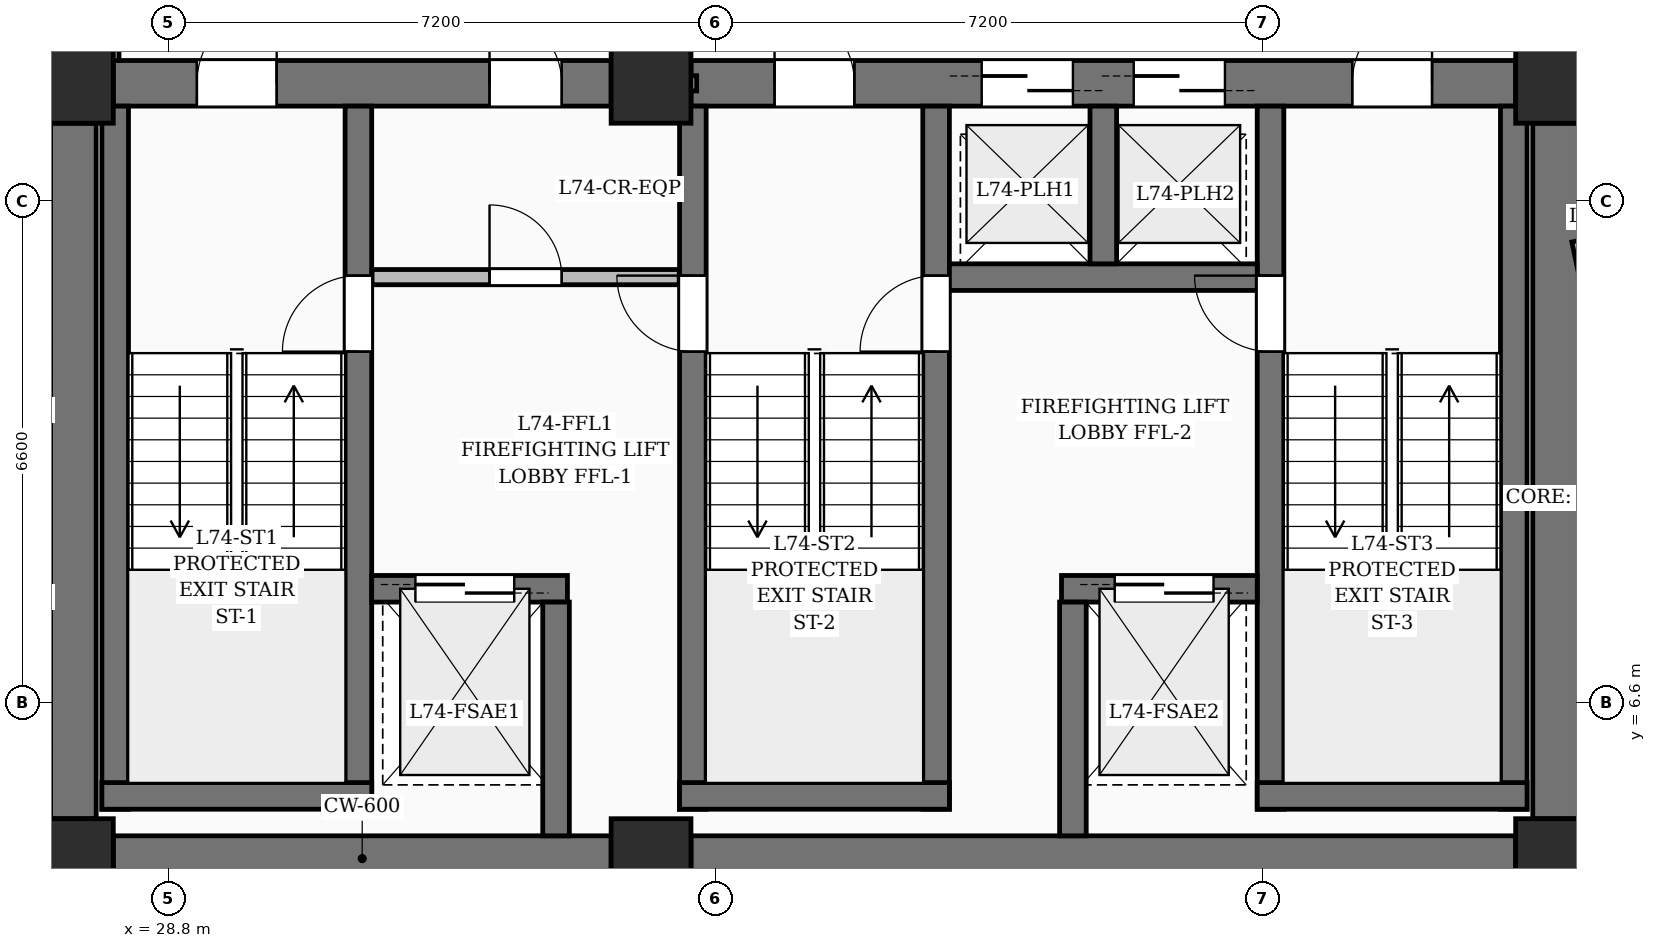
"""IFC4 building model, lengths in metres.
Left out: names, types, materials, properties, quantities, classifications, styles, units other than length and angle.
Written with IfcOpenShell. Run it as: python <this file> out.ifc"""

import sys

from ifc_helpers import new_model, si_unit, direction, frame, frame_2d, origin, origin_2d, place, context, subcontext, project, spatial, rectangle, extrude, element, fill, save


model = new_model("IFC4")
c1 = context("Model", 3, precision=1e-05, world=origin(), true_north=direction((0.0, 1.0)))
c2 = subcontext(c1, "Body", "Model", "MODEL_VIEW")
j1 = project(units=[si_unit("LENGTHUNIT", "METRE"), si_unit("PLANEANGLEUNIT", "RADIAN")], contexts=[c1])
p1 = place(None, origin())
s1 = spatial("IfcSite", under=j1, at=p1, CompositionType="ELEMENT")
p2 = place(p1, origin())
s2 = spatial("IfcBuilding", under=s1, at=p2, CompositionType="ELEMENT")
p3 = place(p2, frame((0.0, 0.0, 285.75)))
s3 = spatial("IfcBuildingStorey", under=s2, at=p3, CompositionType="ELEMENT", Elevation=285.75)
for number, where, z_axis, x_axis in (
    (1, (27.55, 4.55, 0.0), (0.0, 0.0, 1.0), (1.0, 0.0, 0.0)),
    (2, (35.15, 4.55, 0.0), (0.0, 0.0, 1.0), (1.0, 0.0, 0.0)),
    (3, (47.05, 4.55, 0.0), (0.0, 0.0, 1.0), (1.0, 0.0, 0.0)),
    (4, (27.55, 14.75, 0.0), (0.0, 0.0, 1.0), (1.0, 0.0, 0.0)),
    (5, (35.15, 14.75, 0.0), (0.0, 0.0, 1.0), (1.0, 0.0, 0.0)),
    (6, (47.05, 14.75, 0.0), (0.0, 0.0, 1.0), (1.0, 0.0, 0.0)),
):
    element("IfcColumn", number, at=place(p3, frame(where, z_axis=z_axis, x_axis=x_axis)), inside=s3, PredefinedType="COLUMN", context=c2, shape_type="SweptSolid", body=[
        extrude(rectangle(XDim=1.05, YDim=1.05, at=origin_2d()), origin(), (0.0, 0.0, 1.0), 3.75),
    ])
p4 = place(p3, frame((28.075, 4.55, 0.0), z_axis=(0.0, 0.0, 1.0), x_axis=(1.0, 0.0, 0.0)))
e7 = element("IfcWall", 7, at=p4, inside=s3, PredefinedType="SHEAR", context=c2, shape_type="SweptSolid", body=[
    extrude(rectangle(XDim=6.55, YDim=0.6, at=frame_2d((3.275, 0.0))), origin(), (0.0, 0.0, 1.0), 3.75),
])
p5 = place(p3, frame((35.675, 4.55, 0.0), z_axis=(0.0, 0.0, 1.0), x_axis=(1.0, 0.0, 0.0)))
e8 = element("IfcWall", 8, at=p5, inside=s3, PredefinedType="SHEAR", context=c2, shape_type="SweptSolid", body=[
    extrude(rectangle(XDim=10.85, YDim=0.6, at=frame_2d((5.425, 0.0))), origin(), (0.0, 0.0, 1.0), 3.75),
])
p6 = place(p3, frame((28.075, 14.75, 0.0), z_axis=(0.0, 0.0, 1.0), x_axis=(1.0, 0.0, 0.0)))
e9 = element("IfcWall", 9, at=p6, inside=s3, PredefinedType="SHEAR", context=c2, shape_type="SweptSolid", body=[
    extrude(rectangle(XDim=6.55, YDim=0.6, at=frame_2d((3.275, 0.0))), origin(), (0.0, 0.0, 1.0), 3.75),
])
p7 = place(p6, frame((1.1, 0.0, 0.0)))
e10 = element("IfcOpeningElement", 10, at=p7, cuts=e9, PredefinedType="OPENING", context=c2, shape_type="SweptSolid", body=[
    extrude(rectangle(XDim=1.05, YDim=2.15, at=frame_2d((0.525, 1.075))), frame((0.0, 0.31, 0.0), z_axis=(0.0, -1.0, 0.0), x_axis=(1.0, 0.0, 0.0)), (0.0, 0.0, 1.0), 0.62),
])
p8 = place(p6, frame((4.95, 0.0, 0.0)))
e11 = element("IfcOpeningElement", 11, at=p8, cuts=e9, PredefinedType="OPENING", context=c2, shape_type="SweptSolid", body=[
    extrude(rectangle(XDim=0.95, YDim=2.15, at=frame_2d((0.475, 1.075))), frame((0.0, 0.31, 0.0), z_axis=(0.0, -1.0, 0.0), x_axis=(1.0, 0.0, 0.0)), (0.0, 0.0, 1.0), 0.62),
])
p9 = place(p3, frame((35.675, 14.75, 0.0), z_axis=(0.0, 0.0, 1.0), x_axis=(1.0, 0.0, 0.0)))
e12 = element("IfcWall", 12, at=p9, inside=s3, PredefinedType="SHEAR", context=c2, shape_type="SweptSolid", body=[
    extrude(rectangle(XDim=10.85, YDim=0.6, at=frame_2d((5.425, 0.0))), origin(), (0.0, 0.0, 1.0), 3.75),
])
p10 = place(p9, frame((1.1, 0.0, 0.0)))
e13 = element("IfcOpeningElement", 13, at=p10, cuts=e12, PredefinedType="OPENING", context=c2, shape_type="SweptSolid", body=[
    extrude(rectangle(XDim=1.05, YDim=2.15, at=frame_2d((0.525, 1.075))), frame((0.0, 0.31, 0.0), z_axis=(0.0, -1.0, 0.0), x_axis=(1.0, 0.0, 0.0)), (0.0, 0.0, 1.0), 0.62),
])
p11 = place(p9, frame((8.7, 0.0, 0.0)))
e14 = element("IfcOpeningElement", 14, at=p11, cuts=e12, PredefinedType="OPENING", context=c2, shape_type="SweptSolid", body=[
    extrude(rectangle(XDim=1.05, YDim=2.15, at=frame_2d((0.525, 1.075))), frame((0.0, 0.31, 0.0), z_axis=(0.0, -1.0, 0.0), x_axis=(1.0, 0.0, 0.0)), (0.0, 0.0, 1.0), 0.62),
])
p12 = place(p9, frame((3.825, 0.0, 0.0)))
e15 = element("IfcOpeningElement", 15, at=p12, cuts=e12, PredefinedType="OPENING", context=c2, shape_type="SweptSolid", body=[
    extrude(rectangle(XDim=1.2, YDim=2.2, at=frame_2d((0.6, 1.1))), frame((0.0, 0.31, 0.0), z_axis=(0.0, -1.0, 0.0), x_axis=(1.0, 0.0, 0.0)), (0.0, 0.0, 1.0), 0.62),
])
p13 = place(p9, frame((5.825, 0.0, 0.0)))
e16 = element("IfcOpeningElement", 16, at=p13, cuts=e12, PredefinedType="OPENING", context=c2, shape_type="SweptSolid", body=[
    extrude(rectangle(XDim=1.2, YDim=2.2, at=frame_2d((0.6, 1.1))), frame((0.0, 0.31, 0.0), z_axis=(0.0, -1.0, 0.0), x_axis=(1.0, 0.0, 0.0)), (0.0, 0.0, 1.0), 0.62),
])
for number, where, z_axis, x_axis in (
    (17, (27.55, 5.075, 0.0), (0.0, 0.0, 1.0), (0.0, 1.0, 0.0)),
    (18, (47.05, 5.075, 0.0), (0.0, 0.0, 1.0), (0.0, 1.0, 0.0)),
):
    element("IfcWall", number, at=place(p3, frame(where, z_axis=z_axis, x_axis=x_axis)), inside=s3, PredefinedType="SHEAR", context=c2, shape_type="SweptSolid", body=[
        extrude(rectangle(XDim=9.15, YDim=0.6, at=frame_2d((4.575, 0.0))), origin(), (0.0, 0.0, 1.0), 3.75),
    ])
p14 = place(p3, frame((28.1, 5.2, 0.0), z_axis=(0.0, 0.0, 1.0), x_axis=(0.0, 1.0, 0.0)))
e19 = element("IfcWall", 19, at=p14, inside=s3, PredefinedType="SOLIDWALL", context=c2, shape_type="SweptSolid", body=[
    extrude(rectangle(XDim=9.25, YDim=0.35, at=frame_2d((4.625, 0.0))), origin(), (0.0, 0.0, 1.0), 3.75),
])
p15 = place(p3, frame((31.3, 5.2, 0.0), z_axis=(0.0, 0.0, 1.0), x_axis=(0.0, 1.0, 0.0)))
e20 = element("IfcWall", 20, at=p15, inside=s3, PredefinedType="SOLIDWALL", context=c2, shape_type="SweptSolid", body=[
    extrude(rectangle(XDim=9.25, YDim=0.35, at=frame_2d((4.625, 0.0))), origin(), (0.0, 0.0, 1.0), 3.75),
])
p16 = place(p15, frame((6.02, 0.0, 0.0)))
e21 = element("IfcOpeningElement", 21, at=p16, cuts=e20, PredefinedType="OPENING", context=c2, shape_type="SweptSolid", body=[
    extrude(rectangle(XDim=1.0, YDim=2.15, at=frame_2d((0.5, 1.075))), frame((0.0, 0.185, 0.0), z_axis=(0.0, -1.0, 0.0), x_axis=(1.0, 0.0, 0.0)), (0.0, 0.0, 1.0), 0.37),
])
p17 = place(p3, frame((27.925, 5.375, 0.0), z_axis=(0.0, 0.0, 1.0), x_axis=(1.0, 0.0, 0.0)))
e22 = element("IfcWall", 22, at=p17, inside=s3, PredefinedType="SOLIDWALL", context=c2, shape_type="SweptSolid", body=[
    extrude(rectangle(XDim=3.55, YDim=0.35, at=frame_2d((1.775, 0.0))), origin(), (0.0, 0.0, 1.0), 3.75),
])
p18 = place(p3, frame((35.7, 5.2, 0.0), z_axis=(0.0, 0.0, 1.0), x_axis=(0.0, 1.0, 0.0)))
e23 = element("IfcWall", 23, at=p18, inside=s3, PredefinedType="SOLIDWALL", context=c2, shape_type="SweptSolid", body=[
    extrude(rectangle(XDim=9.25, YDim=0.35, at=frame_2d((4.625, 0.0))), origin(), (0.0, 0.0, 1.0), 3.75),
])
p19 = place(p18, frame((6.02, 0.0, 0.0)))
e24 = element("IfcOpeningElement", 24, at=p19, cuts=e23, PredefinedType="OPENING", context=c2, shape_type="SweptSolid", body=[
    extrude(rectangle(XDim=1.0, YDim=2.15, at=frame_2d((0.5, 1.075))), frame((0.0, 0.185, 0.0), z_axis=(0.0, -1.0, 0.0), x_axis=(1.0, 0.0, 0.0)), (0.0, 0.0, 1.0), 0.37),
])
p20 = place(p3, frame((38.9, 5.2, 0.0), z_axis=(0.0, 0.0, 1.0), x_axis=(0.0, 1.0, 0.0)))
e25 = element("IfcWall", 25, at=p20, inside=s3, PredefinedType="SOLIDWALL", context=c2, shape_type="SweptSolid", body=[
    extrude(rectangle(XDim=9.25, YDim=0.35, at=frame_2d((4.625, 0.0))), origin(), (0.0, 0.0, 1.0), 3.75),
])
p21 = place(p20, frame((6.02, 0.0, 0.0)))
e26 = element("IfcOpeningElement", 26, at=p21, cuts=e25, PredefinedType="OPENING", context=c2, shape_type="SweptSolid", body=[
    extrude(rectangle(XDim=1.0, YDim=2.15, at=frame_2d((0.5, 1.075))), frame((0.0, 0.185, 0.0), z_axis=(0.0, -1.0, 0.0), x_axis=(1.0, 0.0, 0.0)), (0.0, 0.0, 1.0), 0.37),
])
p22 = place(p3, frame((35.525, 5.375, 0.0), z_axis=(0.0, 0.0, 1.0), x_axis=(1.0, 0.0, 0.0)))
e27 = element("IfcWall", 27, at=p22, inside=s3, PredefinedType="SOLIDWALL", context=c2, shape_type="SweptSolid", body=[
    extrude(rectangle(XDim=3.55, YDim=0.35, at=frame_2d((1.775, 0.0))), origin(), (0.0, 0.0, 1.0), 3.75),
])
p23 = place(p3, frame((43.3, 5.2, 0.0), z_axis=(0.0, 0.0, 1.0), x_axis=(0.0, 1.0, 0.0)))
e28 = element("IfcWall", 28, at=p23, inside=s3, PredefinedType="SOLIDWALL", context=c2, shape_type="SweptSolid", body=[
    extrude(rectangle(XDim=9.25, YDim=0.35, at=frame_2d((4.625, 0.0))), origin(), (0.0, 0.0, 1.0), 3.75),
])
p24 = place(p23, frame((6.02, 0.0, 0.0)))
e29 = element("IfcOpeningElement", 29, at=p24, cuts=e28, PredefinedType="OPENING", context=c2, shape_type="SweptSolid", body=[
    extrude(rectangle(XDim=1.0, YDim=2.15, at=frame_2d((0.5, 1.075))), frame((0.0, 0.185, 0.0), z_axis=(0.0, -1.0, 0.0), x_axis=(1.0, 0.0, 0.0)), (0.0, 0.0, 1.0), 0.37),
])
p25 = place(p3, frame((46.5, 5.2, 0.0), z_axis=(0.0, 0.0, 1.0), x_axis=(0.0, 1.0, 0.0)))
e30 = element("IfcWall", 30, at=p25, inside=s3, PredefinedType="SOLIDWALL", context=c2, shape_type="SweptSolid", body=[
    extrude(rectangle(XDim=9.25, YDim=0.35, at=frame_2d((4.625, 0.0))), origin(), (0.0, 0.0, 1.0), 3.75),
])
p26 = place(p3, frame((43.125, 5.375, 0.0), z_axis=(0.0, 0.0, 1.0), x_axis=(1.0, 0.0, 0.0)))
e31 = element("IfcWall", 31, at=p26, inside=s3, PredefinedType="SOLIDWALL", context=c2, shape_type="SweptSolid", body=[
    extrude(rectangle(XDim=3.55, YDim=0.35, at=frame_2d((1.775, 0.0))), origin(), (0.0, 0.0, 1.0), 3.75),
])
p27 = place(p3, frame((31.475, 8.1, 0.0), z_axis=(0.0, 0.0, 1.0), x_axis=(1.0, 0.0, 0.0)))
e32 = element("IfcWall", 32, at=p27, inside=s3, PredefinedType="SOLIDWALL", context=c2, shape_type="SweptSolid", body=[
    extrude(rectangle(XDim=2.575, YDim=0.35, at=frame_2d((1.288, 0.0))), origin(), (0.0, 0.0, 1.0), 3.75),
])
p28 = place(p27, frame((0.575, 0.0, 0.0)))
e33 = element("IfcOpeningElement", 33, at=p28, cuts=e32, PredefinedType="OPENING", context=c2, shape_type="SweptSolid", body=[
    extrude(rectangle(XDim=1.3, YDim=2.25, at=frame_2d((0.65, 1.125))), frame((0.0, 0.185, 0.0), z_axis=(0.0, -1.0, 0.0), x_axis=(1.0, 0.0, 0.0)), (0.0, 0.0, 1.0), 0.37),
])
p29 = place(p3, frame((40.55, 8.1, 0.0), z_axis=(0.0, 0.0, 1.0), x_axis=(1.0, 0.0, 0.0)))
e34 = element("IfcWall", 34, at=p29, inside=s3, PredefinedType="SOLIDWALL", context=c2, shape_type="SweptSolid", body=[
    extrude(rectangle(XDim=2.575, YDim=0.35, at=frame_2d((1.288, 0.0))), origin(), (0.0, 0.0, 1.0), 3.75),
])
p30 = place(p29, frame((0.7, 0.0, 0.0)))
e35 = element("IfcOpeningElement", 35, at=p30, cuts=e34, PredefinedType="OPENING", context=c2, shape_type="SweptSolid", body=[
    extrude(rectangle(XDim=1.3, YDim=2.25, at=frame_2d((0.65, 1.125))), frame((0.0, 0.185, 0.0), z_axis=(0.0, -1.0, 0.0), x_axis=(1.0, 0.0, 0.0)), (0.0, 0.0, 1.0), 0.37),
])
for number, where, z_axis, x_axis in (
    (36, (33.9, 4.85, 0.0), (0.0, 0.0, 1.0), (0.0, 1.0, 0.0)),
    (37, (40.7, 4.85, 0.0), (0.0, 0.0, 1.0), (0.0, 1.0, 0.0)),
):
    element("IfcWall", number, at=place(p3, frame(where, z_axis=z_axis, x_axis=x_axis)), inside=s3, PredefinedType="SOLIDWALL", context=c2, shape_type="SweptSolid", body=[
        extrude(rectangle(XDim=3.075, YDim=0.35, at=frame_2d((1.538, 0.0))), origin(), (0.0, 0.0, 1.0), 3.75),
    ])
p31 = place(p3, frame((39.075, 12.2, 0.0), z_axis=(0.0, 0.0, 1.0), x_axis=(1.0, 0.0, 0.0)))
e38 = element("IfcWall", 38, at=p31, inside=s3, PredefinedType="SOLIDWALL", context=c2, shape_type="SweptSolid", body=[
    extrude(rectangle(XDim=4.05, YDim=0.35, at=frame_2d((2.025, 0.0))), origin(), (0.0, 0.0, 1.0), 3.75),
])
p32 = place(p3, frame((41.1, 12.375, 0.0), z_axis=(0.0, 0.0, 1.0), x_axis=(0.0, 1.0, 0.0)))
e39 = element("IfcWall", 39, at=p32, inside=s3, PredefinedType="SOLIDWALL", context=c2, shape_type="SweptSolid", body=[
    extrude(rectangle(XDim=2.075, YDim=0.35, at=frame_2d((1.038, 0.0))), origin(), (0.0, 0.0, 1.0), 3.75),
])
p33 = place(p3, frame((34.72, 14.75, 0.0), z_axis=(0.0, 0.0, 1.0), x_axis=(1.0, 0.0, 0.0)))
e40 = element("IfcWall", 40, at=p33, inside=s3, PredefinedType="PARTITIONING", context=c2, shape_type="SweptSolid", body=[
    extrude(rectangle(XDim=1.03, YDim=0.2, at=frame_2d((0.515, 0.0))), origin(), (0.0, 0.0, 1.0), 2.635),
])
p34 = place(p3, frame((31.48, 12.2, 0.0), z_axis=(0.0, 0.0, 1.0), x_axis=(1.0, 0.0, 0.0)))
e41 = element("IfcWall", 41, at=p34, inside=s3, PredefinedType="PARTITIONING", context=c2, shape_type="SweptSolid", body=[
    extrude(rectangle(XDim=4.04, YDim=0.2, at=frame_2d((2.02, 0.0))), origin(), (0.0, 0.0, 1.0), 3.45),
])
p35 = place(p34, frame((1.545, 0.0, 0.0)))
e42 = element("IfcOpeningElement", 42, at=p35, cuts=e41, PredefinedType="OPENING", context=c2, shape_type="SweptSolid", body=[
    extrude(rectangle(XDim=0.95, YDim=2.15, at=frame_2d((0.475, 1.075))), frame((0.0, 0.11, 0.0), z_axis=(0.0, -1.0, 0.0), x_axis=(1.0, 0.0, 0.0)), (0.0, 0.0, 1.0), 0.22),
])
p36 = place(p3, frame((46.8, 15.05, 0.0), z_axis=(0.0, 0.0, 1.0), x_axis=(0.0, 1.0, 0.0)))
e43 = element("IfcWall", 43, at=p36, inside=s3, PredefinedType="PARTITIONING", context=c2, shape_type="SweptSolid", body=[
    extrude(rectangle(XDim=2.3, YDim=0.2, at=frame_2d((1.15, 0.0))), origin(), (0.0, 0.0, 1.0), 2.635),
])
p37 = place(p3, frame((49.642, 1.897, 0.0), z_axis=(0.0, 0.0, 1.0), x_axis=(-0.207911994687, 0.978147536144, 0.0)))
e44 = element("IfcWall", 44, at=p37, inside=s3, PredefinedType="PARTITIONING", context=c2, shape_type="SweptSolid", body=[
    extrude(rectangle(XDim=11.024, YDim=0.175, at=frame_2d((5.512, 0.0))), origin(), (0.0, 0.0, 1.0), 2.635),
])
p38 = place(p37, frame((4.928, 0.0, 0.0)))
e45 = element("IfcOpeningElement", 45, at=p38, cuts=e44, PredefinedType="OPENING", context=c2, shape_type="SweptSolid", body=[
    extrude(rectangle(XDim=0.95, YDim=2.2, at=frame_2d((0.475, 1.1))), frame((0.0, 0.097, 0.0), z_axis=(0.0, -1.0, 0.0), x_axis=(1.0, 0.0, 0.0)), (0.0, 0.0, 1.0), 0.195),
])
p39 = place(p3, frame((28.05, 17.265, 0.0), z_axis=(0.0, 0.0, 1.0), x_axis=(0.0, -1.0, 0.0)))
e46 = element("IfcWall", 46, at=p39, inside=s3, PredefinedType="PARTITIONING", context=c2, shape_type="SweptSolid", body=[
    extrude(rectangle(XDim=2.215, YDim=0.2, at=frame_2d((1.107, 0.0))), origin(), (0.0, 0.0, 1.0), 3.45),
])
p40 = place(p7, origin())
e47 = element("IfcDoor", 47, at=p40, inside=s3, OperationType="SINGLE_SWING_RIGHT", PredefinedType="DOOR", context=c2, shape_type="SweptSolid", body=[
    extrude(rectangle(XDim=1.05, YDim=2.15, at=frame_2d((0.525, 1.075))), frame((0.0, 0.025, 0.0), z_axis=(0.0, -1.0, 0.0), x_axis=(1.0, 0.0, 0.0)), (0.0, 0.0, 1.0), 0.05),
])
fill(e10, e47)
p41 = place(p10, origin())
e48 = element("IfcDoor", 48, at=p41, inside=s3, OperationType="SINGLE_SWING_LEFT", PredefinedType="DOOR", context=c2, shape_type="SweptSolid", body=[
    extrude(rectangle(XDim=1.05, YDim=2.15, at=frame_2d((0.525, 1.075))), frame((0.0, 0.025, 0.0), z_axis=(0.0, -1.0, 0.0), x_axis=(1.0, 0.0, 0.0)), (0.0, 0.0, 1.0), 0.05),
])
fill(e13, e48)
p42 = place(p11, origin())
e49 = element("IfcDoor", 49, at=p42, inside=s3, OperationType="SINGLE_SWING_RIGHT", PredefinedType="DOOR", context=c2, shape_type="SweptSolid", body=[
    extrude(rectangle(XDim=1.05, YDim=2.15, at=frame_2d((0.525, 1.075))), frame((0.0, 0.025, 0.0), z_axis=(0.0, -1.0, 0.0), x_axis=(1.0, 0.0, 0.0)), (0.0, 0.0, 1.0), 0.05),
])
fill(e14, e49)
p43 = place(p16, origin())
e50 = element("IfcDoor", 50, at=p43, inside=s3, OperationType="SINGLE_SWING_LEFT", PredefinedType="DOOR", context=c2, shape_type="SweptSolid", body=[
    extrude(rectangle(XDim=1.0, YDim=2.15, at=frame_2d((0.5, 1.075))), frame((0.0, 0.025, 0.0), z_axis=(0.0, -1.0, 0.0), x_axis=(1.0, 0.0, 0.0)), (0.0, 0.0, 1.0), 0.05),
])
fill(e21, e50)
p44 = place(p19, origin())
e51 = element("IfcDoor", 51, at=p44, inside=s3, OperationType="SINGLE_SWING_RIGHT", PredefinedType="DOOR", context=c2, shape_type="SweptSolid", body=[
    extrude(rectangle(XDim=1.0, YDim=2.15, at=frame_2d((0.5, 1.075))), frame((0.0, 0.025, 0.0), z_axis=(0.0, -1.0, 0.0), x_axis=(1.0, 0.0, 0.0)), (0.0, 0.0, 1.0), 0.05),
])
fill(e24, e51)
p45 = place(p21, origin())
e52 = element("IfcDoor", 52, at=p45, inside=s3, OperationType="SINGLE_SWING_LEFT", PredefinedType="DOOR", context=c2, shape_type="SweptSolid", body=[
    extrude(rectangle(XDim=1.0, YDim=2.15, at=frame_2d((0.5, 1.075))), frame((0.0, 0.025, 0.0), z_axis=(0.0, -1.0, 0.0), x_axis=(1.0, 0.0, 0.0)), (0.0, 0.0, 1.0), 0.05),
])
fill(e26, e52)
p46 = place(p24, origin())
e53 = element("IfcDoor", 53, at=p46, inside=s3, OperationType="SINGLE_SWING_RIGHT", PredefinedType="DOOR", context=c2, shape_type="SweptSolid", body=[
    extrude(rectangle(XDim=1.0, YDim=2.15, at=frame_2d((0.5, 1.075))), frame((0.0, 0.025, 0.0), z_axis=(0.0, -1.0, 0.0), x_axis=(1.0, 0.0, 0.0)), (0.0, 0.0, 1.0), 0.05),
])
fill(e29, e53)
p47 = place(p28, origin())
e54 = element("IfcDoor", 54, at=p47, inside=s3, OperationType="DOUBLE_DOOR_SLIDING", PredefinedType="DOOR", context=c2, shape_type="SweptSolid", body=[
    extrude(rectangle(XDim=1.3, YDim=2.25, at=frame_2d((0.65, 1.125))), frame((0.0, 0.025, 0.0), z_axis=(0.0, -1.0, 0.0), x_axis=(1.0, 0.0, 0.0)), (0.0, 0.0, 1.0), 0.05),
])
fill(e33, e54)
p48 = place(p30, origin())
e55 = element("IfcDoor", 55, at=p48, inside=s3, OperationType="DOUBLE_DOOR_SLIDING", PredefinedType="DOOR", context=c2, shape_type="SweptSolid", body=[
    extrude(rectangle(XDim=1.3, YDim=2.25, at=frame_2d((0.65, 1.125))), frame((0.0, 0.025, 0.0), z_axis=(0.0, -1.0, 0.0), x_axis=(1.0, 0.0, 0.0)), (0.0, 0.0, 1.0), 0.05),
])
fill(e35, e55)
p49 = place(p12, origin())
e56 = element("IfcDoor", 56, at=p49, inside=s3, OperationType="DOUBLE_DOOR_SLIDING", PredefinedType="DOOR", context=c2, shape_type="SweptSolid", body=[
    extrude(rectangle(XDim=1.2, YDim=2.2, at=frame_2d((0.6, 1.1))), frame((0.0, 0.025, 0.0), z_axis=(0.0, -1.0, 0.0), x_axis=(1.0, 0.0, 0.0)), (0.0, 0.0, 1.0), 0.05),
])
fill(e15, e56)
p50 = place(p13, origin())
e57 = element("IfcDoor", 57, at=p50, inside=s3, OperationType="DOUBLE_DOOR_SLIDING", PredefinedType="DOOR", context=c2, shape_type="SweptSolid", body=[
    extrude(rectangle(XDim=1.2, YDim=2.2, at=frame_2d((0.6, 1.1))), frame((0.0, 0.025, 0.0), z_axis=(0.0, -1.0, 0.0), x_axis=(1.0, 0.0, 0.0)), (0.0, 0.0, 1.0), 0.05),
])
fill(e16, e57)
p51 = place(p35, origin())
e58 = element("IfcDoor", 58, at=p51, inside=s3, OperationType="SINGLE_SWING_LEFT", PredefinedType="DOOR", context=c2, shape_type="SweptSolid", body=[
    extrude(rectangle(XDim=0.95, YDim=2.15, at=frame_2d((0.475, 1.075))), frame((0.0, 0.025, 0.0), z_axis=(0.0, -1.0, 0.0), x_axis=(1.0, 0.0, 0.0)), (0.0, 0.0, 1.0), 0.05),
])
fill(e42, e58)
p52 = place(p8, origin())
e59 = element("IfcDoor", 59, at=p52, inside=s3, OperationType="SINGLE_SWING_LEFT", PredefinedType="DOOR", context=c2, shape_type="SweptSolid", body=[
    extrude(rectangle(XDim=0.95, YDim=2.15, at=frame_2d((0.475, 1.075))), frame((0.0, 0.025, 0.0), z_axis=(0.0, -1.0, 0.0), x_axis=(1.0, 0.0, 0.0)), (0.0, 0.0, 1.0), 0.05),
])
fill(e11, e59)
save(model, sys.argv[1])
